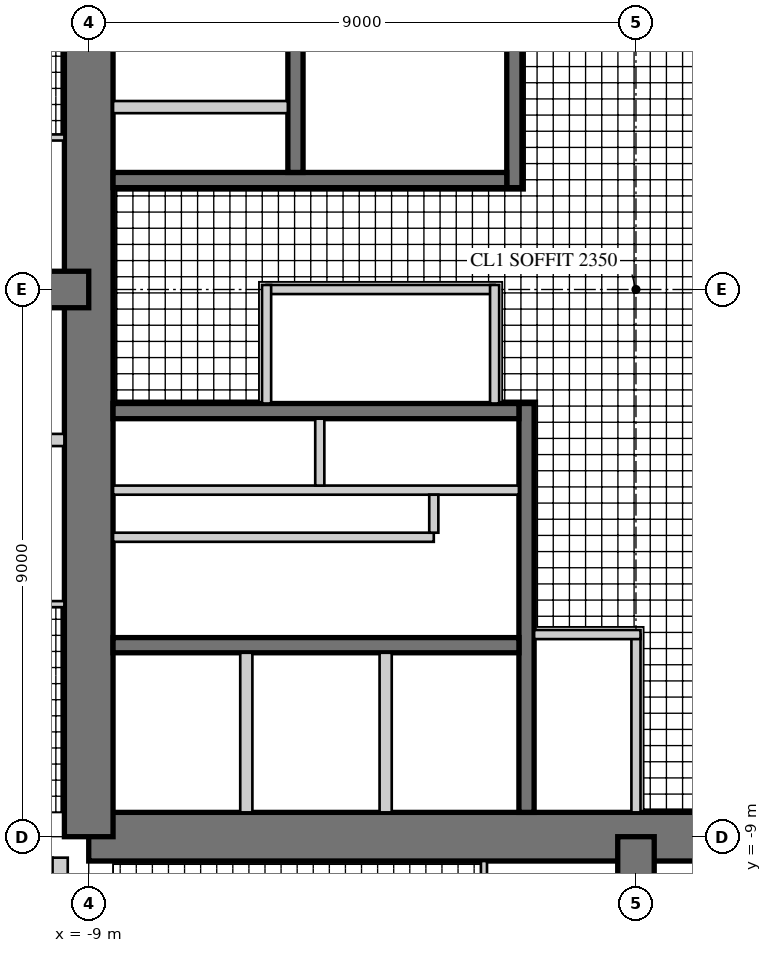
"""IFC4 building model, lengths in metres.
Left out: names, types, materials, properties, quantities, classifications, styles, units other than length and angle.
Written with IfcOpenShell. Run it as: python <this file> out.ifc"""

import sys

from ifc_helpers import new_model, si_unit, direction, frame, frame_2d, origin, place, context, subcontext, project, spatial, rectangle, extrude, element, fill, save


model = new_model("IFC4")
c1 = context("Model", 3, precision=1e-05, world=origin(), true_north=direction((0.0, 1.0)))
c2 = subcontext(c1, "Body", "Model", "MODEL_VIEW")
j1 = project(units=[si_unit("LENGTHUNIT", "METRE"), si_unit("PLANEANGLEUNIT", "RADIAN")], contexts=[c1])
p1 = place(None, origin())
s1 = spatial("IfcSite", under=j1, at=p1, CompositionType="ELEMENT")
p2 = place(p1, origin())
s2 = spatial("IfcBuilding", under=s1, at=p2, CompositionType="ELEMENT")
p3 = place(p2, frame((0.0, 0.0, 267.9)))
s3 = spatial("IfcBuildingStorey", under=s2, at=p3, CompositionType="ELEMENT", Elevation=267.9)
p4 = place(p3, frame((-9.0, -9.0, 0.0), z_axis=(0.0, 0.0, 1.0), x_axis=(1.0, 0.0, 0.0)))
e1 = element("IfcWall", 1, at=p4, inside=s3, PredefinedType="SHEAR", context=c2, shape_type="SweptSolid", body=[
    extrude(rectangle(XDim=18.0, YDim=0.8, at=frame_2d((9.0, 0.0))), origin(), (0.0, 0.0, 1.0), 3.4),
])
p5 = place(p4, frame((9.8, 0.0, 0.0)))
e2 = element("IfcOpeningElement", 2, at=p5, cuts=e1, PredefinedType="OPENING", context=c2, shape_type="SweptSolid", body=[
    extrude(rectangle(XDim=1.0, YDim=2.4, at=frame_2d((0.5, 1.2))), frame((0.0, 0.41, 0.0), z_axis=(0.0, -1.0, 0.0), x_axis=(1.0, 0.0, 0.0)), (0.0, 0.0, 1.0), 0.82),
])
p6 = place(p3, frame((-9.0, 9.0, 0.0), z_axis=(0.0, 0.0, 1.0), x_axis=(0.0, -1.0, 0.0)))
e3 = element("IfcWall", 3, at=p6, inside=s3, PredefinedType="SHEAR", context=c2, shape_type="SweptSolid", body=[
    extrude(rectangle(XDim=18.0, YDim=0.8, at=frame_2d((9.0, 0.0))), origin(), (0.0, 0.0, 1.0), 3.4),
])
p7 = place(p6, frame((9.8, 0.0, 0.0)))
e4 = element("IfcOpeningElement", 4, at=p7, cuts=e3, PredefinedType="OPENING", context=c2, shape_type="SweptSolid", body=[
    extrude(rectangle(XDim=1.0, YDim=2.4, at=frame_2d((0.5, 1.2))), frame((0.0, 0.41, 0.0), z_axis=(0.0, -1.0, 0.0), x_axis=(1.0, 0.0, 0.0)), (0.0, 0.0, 1.0), 0.82),
])
p8 = place(p3, frame((-2.0, 1.675, 0.0), z_axis=(0.0, 0.0, 1.0), x_axis=(0.0, 1.0, 0.0)))
e5 = element("IfcWall", 5, at=p8, inside=s3, PredefinedType="SHEAR", context=c2, shape_type="SweptSolid", body=[
    extrude(rectangle(XDim=6.925, YDim=0.25, at=frame_2d((3.462, 0.0))), origin(), (0.0, 0.0, 1.0), 3.4),
])
p9 = place(p8, frame((0.725, 0.0, 0.0)))
e6 = element("IfcOpeningElement", 6, at=p9, cuts=e5, PredefinedType="OPENING", context=c2, shape_type="SweptSolid", body=[
    extrude(rectangle(XDim=1.0, YDim=2.1, at=frame_2d((0.5, 1.05))), frame((0.0, 0.135, 0.0), z_axis=(0.0, -1.0, 0.0), x_axis=(1.0, 0.0, 0.0)), (0.0, 0.0, 1.0), 0.27),
])
p10 = place(p3, frame((-2.125, 1.8, 0.0), z_axis=(0.0, 0.0, 1.0), x_axis=(-1.0, 0.0, 0.0)))
e7 = element("IfcWall", 7, at=p10, inside=s3, PredefinedType="SHEAR", context=c2, shape_type="SweptSolid", body=[
    extrude(rectangle(XDim=6.475, YDim=0.25, at=frame_2d((3.238, 0.0))), origin(), (0.0, 0.0, 1.0), 3.4),
])
p11 = place(p3, frame((-5.6, 1.925, 0.0), z_axis=(0.0, 0.0, 1.0), x_axis=(0.0, 1.0, 0.0)))
e8 = element("IfcWall", 8, at=p11, inside=s3, PredefinedType="SHEAR", context=c2, shape_type="SweptSolid", body=[
    extrude(rectangle(XDim=3.55, YDim=0.25, at=frame_2d((1.775, 0.0))), origin(), (0.0, 0.0, 1.0), 3.4),
])
p12 = place(p11, frame((1.525, 0.0, 0.0)))
e9 = element("IfcOpeningElement", 9, at=p12, cuts=e8, PredefinedType="OPENING", context=c2, shape_type="SweptSolid", body=[
    extrude(rectangle(XDim=1.1, YDim=2.2, at=frame_2d((0.55, 1.1))), frame((0.0, 0.135, 0.0), z_axis=(0.0, -1.0, 0.0), x_axis=(1.0, 0.0, 0.0)), (0.0, 0.0, 1.0), 0.27),
])
p13 = place(p11, frame((0.075, 0.0, 0.0)))
e10 = element("IfcOpeningElement", 10, at=p13, cuts=e8, PredefinedType="OPENING", context=c2, shape_type="SweptSolid", body=[
    extrude(rectangle(XDim=0.8, YDim=2.1, at=frame_2d((0.4, 1.05))), frame((0.0, 0.135, 0.0), z_axis=(0.0, -1.0, 0.0), x_axis=(1.0, 0.0, 0.0)), (0.0, 0.0, 1.0), 0.27),
])
p14 = place(p3, frame((-5.725, 3.0, 0.0), z_axis=(0.0, 0.0, 1.0), x_axis=(-1.0, 0.0, 0.0)))
e11 = element("IfcWall", 11, at=p14, inside=s3, PredefinedType="PARTITIONING", context=c2, shape_type="SweptSolid", body=[
    extrude(rectangle(XDim=2.875, YDim=0.2, at=frame_2d((1.438, 0.0))), origin(), (0.0, 0.0, 1.0), 3.4),
])
p15 = place(p3, frame((-1.8, -1.875, 0.0), z_axis=(0.0, 0.0, 1.0), x_axis=(0.0, -1.0, 0.0)))
e12 = element("IfcWall", 12, at=p15, inside=s3, PredefinedType="SHEAR", context=c2, shape_type="SweptSolid", body=[
    extrude(rectangle(XDim=6.725, YDim=0.25, at=frame_2d((3.363, 0.0))), origin(), (0.0, 0.0, 1.0), 3.4),
])
p16 = place(p15, frame((1.875, 0.0, 0.0)))
e13 = element("IfcOpeningElement", 13, at=p16, cuts=e12, PredefinedType="OPENING", context=c2, shape_type="SweptSolid", body=[
    extrude(rectangle(XDim=1.6, YDim=2.4, at=frame_2d((0.8, 1.2))), frame((0.0, 0.135, 0.0), z_axis=(0.0, -1.0, 0.0), x_axis=(1.0, 0.0, 0.0)), (0.0, 0.0, 1.0), 0.27),
])
p17 = place(p3, frame((-1.925, -2.0, 0.0), z_axis=(0.0, 0.0, 1.0), x_axis=(-1.0, 0.0, 0.0)))
e14 = element("IfcWall", 14, at=p17, inside=s3, PredefinedType="SHEAR", context=c2, shape_type="SweptSolid", body=[
    extrude(rectangle(XDim=6.675, YDim=0.25, at=frame_2d((3.337, 0.0))), origin(), (0.0, 0.0, 1.0), 3.4),
])
p18 = place(p3, frame((-1.925, -5.85, 0.0), z_axis=(0.0, 0.0, 1.0), x_axis=(-1.0, 0.0, 0.0)))
e15 = element("IfcWall", 15, at=p18, inside=s3, PredefinedType="SHEAR", context=c2, shape_type="SweptSolid", body=[
    extrude(rectangle(XDim=6.675, YDim=0.25, at=frame_2d((3.337, 0.0))), origin(), (0.0, 0.0, 1.0), 3.4),
])
p19 = place(p18, frame((0.496, 0.0, 0.0)))
e16 = element("IfcOpeningElement", 16, at=p19, cuts=e15, PredefinedType="OPENING", context=c2, shape_type="SweptSolid", body=[
    extrude(rectangle(XDim=1.1, YDim=2.2, at=frame_2d((0.55, 1.1))), frame((0.0, 0.135, 0.0), z_axis=(0.0, -1.0, 0.0), x_axis=(1.0, 0.0, 0.0)), (0.0, 0.0, 1.0), 0.27),
])
p20 = place(p18, frame((2.788, 0.0, 0.0)))
e17 = element("IfcOpeningElement", 17, at=p20, cuts=e15, PredefinedType="OPENING", context=c2, shape_type="SweptSolid", body=[
    extrude(rectangle(XDim=1.1, YDim=2.2, at=frame_2d((0.55, 1.1))), frame((0.0, 0.135, 0.0), z_axis=(0.0, -1.0, 0.0), x_axis=(1.0, 0.0, 0.0)), (0.0, 0.0, 1.0), 0.27),
])
p21 = place(p18, frame((5.079, 0.0, 0.0)))
e18 = element("IfcOpeningElement", 18, at=p21, cuts=e15, PredefinedType="OPENING", context=c2, shape_type="SweptSolid", body=[
    extrude(rectangle(XDim=1.1, YDim=2.2, at=frame_2d((0.55, 1.1))), frame((0.0, 0.135, 0.0), z_axis=(0.0, -1.0, 0.0), x_axis=(1.0, 0.0, 0.0)), (0.0, 0.0, 1.0), 0.27),
])
p22 = place(p3, frame((-1.925, -3.3, 0.0), z_axis=(0.0, 0.0, 1.0), x_axis=(-1.0, 0.0, 0.0)))
e19 = element("IfcWall", 19, at=p22, inside=s3, PredefinedType="PARTITIONING", context=c2, shape_type="SweptSolid", body=[
    extrude(rectangle(XDim=6.675, YDim=0.15, at=frame_2d((3.337, 0.0))), origin(), (0.0, 0.0, 1.0), 3.4),
])
p23 = place(p22, frame((0.075, 0.0, 0.0)))
e20 = element("IfcOpeningElement", 20, at=p23, cuts=e19, PredefinedType="OPENING", context=c2, shape_type="SweptSolid", body=[
    extrude(rectangle(XDim=0.8, YDim=2.1, at=frame_2d((0.4, 1.05))), frame((0.0, 0.085, 0.0), z_axis=(0.0, -1.0, 0.0), x_axis=(1.0, 0.0, 0.0)), (0.0, 0.0, 1.0), 0.17),
])
p24 = place(p22, frame((3.675, 0.0, 0.0)))
e21 = element("IfcOpeningElement", 21, at=p24, cuts=e19, PredefinedType="OPENING", context=c2, shape_type="SweptSolid", body=[
    extrude(rectangle(XDim=0.8, YDim=2.1, at=frame_2d((0.4, 1.05))), frame((0.0, 0.085, 0.0), z_axis=(0.0, -1.0, 0.0), x_axis=(1.0, 0.0, 0.0)), (0.0, 0.0, 1.0), 0.17),
])
p25 = place(p3, frame((-5.2, -2.125, 0.0), z_axis=(0.0, 0.0, 1.0), x_axis=(0.0, -1.0, 0.0)))
e22 = element("IfcWall", 22, at=p25, inside=s3, PredefinedType="PARTITIONING", context=c2, shape_type="SweptSolid", body=[
    extrude(rectangle(XDim=1.1, YDim=0.15, at=frame_2d((0.55, 0.0))), origin(), (0.0, 0.0, 1.0), 3.4),
])
for number, where, z_axis, x_axis in (
    (23, (-4.117, -5.975, 0.0), (0.0, 0.0, 1.0), (0.0, -1.0, 0.0)),
    (24, (-6.408, -5.975, 0.0), (0.0, 0.0, 1.0), (0.0, -1.0, 0.0)),
):
    element("IfcWall", number, at=place(p3, frame(where, z_axis=z_axis, x_axis=x_axis)), inside=s3, PredefinedType="PARTITIONING", context=c2, shape_type="SweptSolid", body=[
        extrude(rectangle(XDim=2.625, YDim=0.2, at=frame_2d((1.312, 0.0))), origin(), (0.0, 0.0, 1.0), 3.4),
    ])
p26 = place(p3, frame((0.0, -9.0, 0.0), z_axis=(0.0, 0.0, 1.0), x_axis=(0.0, -1.0, 0.0)))
e25 = element("IfcWall", 25, at=p26, inside=s3, PredefinedType="SHEAR", context=c2, shape_type="SweptSolid", body=[
    extrude(rectangle(XDim=9.0, YDim=0.6, at=frame_2d((4.5, 0.0))), origin(), (0.0, 0.0, 1.0), 3.4),
])
p27 = place(p26, frame((3.8, 0.0, 0.0)))
e26 = element("IfcOpeningElement", 26, at=p27, cuts=e25, PredefinedType="OPENING", context=c2, shape_type="SweptSolid", body=[
    extrude(rectangle(XDim=1.0, YDim=2.15, at=frame_2d((0.5, 1.075))), frame((0.0, 0.31, 0.0), z_axis=(0.0, -1.0, 0.0), x_axis=(1.0, 0.0, 0.0)), (0.0, 0.0, 1.0), 0.62),
])
p28 = place(p26, frame((7.0, 0.0, 0.0)))
e27 = element("IfcOpeningElement", 27, at=p28, cuts=e25, PredefinedType="OPENING", context=c2, shape_type="SweptSolid", body=[
    extrude(rectangle(XDim=1.0, YDim=2.2, at=frame_2d((0.5, 1.1))), frame((0.0, 0.31, 0.0), z_axis=(0.0, -1.0, 0.0), x_axis=(1.0, 0.0, 0.0)), (0.0, 0.0, 1.0), 0.62),
])
p29 = place(p3, frame((-9.0, 0.0, 0.0), z_axis=(0.0, 0.0, 1.0), x_axis=(-1.0, 0.0, 0.0)))
e28 = element("IfcWall", 28, at=p29, inside=s3, PredefinedType="SHEAR", context=c2, shape_type="SweptSolid", body=[
    extrude(rectangle(XDim=9.0, YDim=0.6, at=frame_2d((4.5, 0.0))), origin(), (0.0, 0.0, 1.0), 3.4),
])
p30 = place(p29, frame((3.8, 0.0, 0.0)))
e29 = element("IfcOpeningElement", 29, at=p30, cuts=e28, PredefinedType="OPENING", context=c2, shape_type="SweptSolid", body=[
    extrude(rectangle(XDim=1.0, YDim=2.15, at=frame_2d((0.5, 1.075))), frame((0.0, 0.31, 0.0), z_axis=(0.0, -1.0, 0.0), x_axis=(1.0, 0.0, 0.0)), (0.0, 0.0, 1.0), 0.62),
])
p31 = place(p29, frame((7.0, 0.0, 0.0)))
e30 = element("IfcOpeningElement", 30, at=p31, cuts=e28, PredefinedType="OPENING", context=c2, shape_type="SweptSolid", body=[
    extrude(rectangle(XDim=1.0, YDim=2.2, at=frame_2d((0.5, 1.1))), frame((0.0, 0.31, 0.0), z_axis=(0.0, -1.0, 0.0), x_axis=(1.0, 0.0, 0.0)), (0.0, 0.0, 1.0), 0.62),
])
p32 = place(p3, frame((-12.47, -9.47, 0.0), z_axis=(0.0, 0.0, 1.0), x_axis=(1.0, 0.0, 0.0)))
e31 = element("IfcWall", 31, at=p32, inside=s3, PredefinedType="SOLIDWALL", context=c2, shape_type="SweptSolid", body=[
    extrude(rectangle(XDim=2.875, YDim=0.25, at=frame_2d((1.438, 0.0))), origin(), (0.0, 0.0, 1.0), 3.22),
])
p33 = place(p32, frame((0.6, 0.0, 0.0)))
e32 = element("IfcOpeningElement", 32, at=p33, cuts=e31, PredefinedType="OPENING", context=c2, shape_type="SweptSolid", body=[
    extrude(rectangle(XDim=1.0, YDim=2.2, at=frame_2d((0.5, 1.1))), frame((0.0, 0.135, 0.0), z_axis=(0.0, -1.0, 0.0), x_axis=(1.0, 0.0, 0.0)), (0.0, 0.0, 1.0), 0.27),
])
p34 = place(p3, frame((-9.47, -9.345, 0.0), z_axis=(0.0, 0.0, 1.0), x_axis=(0.0, -1.0, 0.0)))
e33 = element("IfcWall", 33, at=p34, inside=s3, PredefinedType="SOLIDWALL", context=c2, shape_type="SweptSolid", body=[
    extrude(rectangle(XDim=3.125, YDim=0.25, at=frame_2d((1.562, 0.0))), origin(), (0.0, 0.0, 1.0), 3.22),
])
p35 = place(p34, frame((0.6, 0.0, 0.0)))
e34 = element("IfcOpeningElement", 34, at=p35, cuts=e33, PredefinedType="OPENING", context=c2, shape_type="SweptSolid", body=[
    extrude(rectangle(XDim=1.0, YDim=2.2, at=frame_2d((0.5, 1.1))), frame((0.0, 0.135, 0.0), z_axis=(0.0, -1.0, 0.0), x_axis=(1.0, 0.0, 0.0)), (0.0, 0.0, 1.0), 0.27),
])
p36 = place(p3, frame((-2.325, 0.0, 0.0), z_axis=(0.0, 0.0, 1.0), x_axis=(-1.0, 0.0, 0.0)))
e35 = element("IfcWall", 35, at=p36, inside=s3, PredefinedType="PARTITIONING", context=c2, shape_type="SweptSolid", body=[
    extrude(rectangle(XDim=3.75, YDim=0.15, at=frame_2d((1.875, 0.0))), origin(), (0.0, 0.0, 1.0), 3.22),
])
p37 = place(p36, frame((0.4, 0.0, 0.0)))
e36 = element("IfcOpeningElement", 36, at=p37, cuts=e35, PredefinedType="OPENING", context=c2, shape_type="SweptSolid", body=[
    extrude(rectangle(XDim=1.0, YDim=2.1, at=frame_2d((0.5, 1.05))), frame((0.0, 0.085, 0.0), z_axis=(0.0, -1.0, 0.0), x_axis=(1.0, 0.0, 0.0)), (0.0, 0.0, 1.0), 0.17),
])
for number, where, z_axis, x_axis in (
    (37, (-2.325, -1.875, 0.0), (0.0, 0.0, 1.0), (0.0, 1.0, 0.0)),
    (38, (-6.075, 0.075, 0.0), (0.0, 0.0, 1.0), (0.0, -1.0, 0.0)),
):
    element("IfcWall", number, at=place(p3, frame(where, z_axis=z_axis, x_axis=x_axis)), inside=s3, PredefinedType="PARTITIONING", context=c2, shape_type="SweptSolid", body=[
        extrude(rectangle(XDim=1.95, YDim=0.15, at=frame_2d((0.975, 0.0))), origin(), (0.0, 0.0, 1.0), 3.22),
    ])
p38 = place(p3, frame((0.0, -5.675, 0.0), z_axis=(0.0, 0.0, 1.0), x_axis=(0.0, -1.0, 0.0)))
e39 = element("IfcWall", 39, at=p38, inside=s3, PredefinedType="PARTITIONING", context=c2, shape_type="SweptSolid", body=[
    extrude(rectangle(XDim=2.925, YDim=0.15, at=frame_2d((1.462, 0.0))), origin(), (0.0, 0.0, 1.0), 3.22),
])
p39 = place(p38, frame((0.4, 0.0, 0.0)))
e40 = element("IfcOpeningElement", 40, at=p39, cuts=e39, PredefinedType="OPENING", context=c2, shape_type="SweptSolid", body=[
    extrude(rectangle(XDim=1.0, YDim=2.1, at=frame_2d((0.5, 1.05))), frame((0.0, 0.085, 0.0), z_axis=(0.0, -1.0, 0.0), x_axis=(1.0, 0.0, 0.0)), (0.0, 0.0, 1.0), 0.17),
])
p40 = place(p3, frame((-1.675, -5.675, 0.0), z_axis=(0.0, 0.0, 1.0), x_axis=(1.0, 0.0, 0.0)))
e41 = element("IfcWall", 41, at=p40, inside=s3, PredefinedType="PARTITIONING", context=c2, shape_type="SweptSolid", body=[
    extrude(rectangle(XDim=1.75, YDim=0.15, at=frame_2d((0.875, 0.0))), origin(), (0.0, 0.0, 1.0), 3.22),
])
p41 = place(p3, frame((-3.325, -4.075, 0.0), z_axis=(0.0, 0.0, 1.0), x_axis=(-1.0, 0.0, 0.0)))
e42 = element("IfcWall", 42, at=p41, inside=s3, PredefinedType="PARTITIONING", context=c2, shape_type="SweptSolid", body=[
    extrude(rectangle(XDim=5.275, YDim=0.15, at=frame_2d((2.638, 0.0))), origin(), (0.0, 0.0, 1.0), 3.22),
])
p42 = place(p41, frame((2.137, 0.0, 0.0)))
e43 = element("IfcOpeningElement", 43, at=p42, cuts=e42, PredefinedType="OPENING", context=c2, shape_type="SweptSolid", body=[
    extrude(rectangle(XDim=1.0, YDim=2.1, at=frame_2d((0.5, 1.05))), frame((0.0, 0.085, 0.0), z_axis=(0.0, -1.0, 0.0), x_axis=(1.0, 0.0, 0.0)), (0.0, 0.0, 1.0), 0.17),
])
p43 = place(p3, frame((-3.325, -3.375, 0.0), z_axis=(0.0, 0.0, 1.0), x_axis=(0.0, -1.0, 0.0)))
e44 = element("IfcWall", 44, at=p43, inside=s3, PredefinedType="PARTITIONING", context=c2, shape_type="SweptSolid", body=[
    extrude(rectangle(XDim=0.625, YDim=0.15, at=frame_2d((0.312, 0.0))), origin(), (0.0, 0.0, 1.0), 3.22),
])
p44 = place(p3, frame((-2.5, -9.4, 0.0), z_axis=(0.0, 0.0, 1.0), x_axis=(0.0, -1.0, 0.0)))
e45 = element("IfcWall", 45, at=p44, inside=s3, PredefinedType="PARTITIONING", context=c2, shape_type="SweptSolid", body=[
    extrude(rectangle(XDim=2.65, YDim=0.1, at=frame_2d((1.325, 0.0))), origin(), (0.0, 0.0, 1.0), 3.22),
])
p45 = place(p3, frame((-9.4, -5.175, 0.0), z_axis=(0.0, 0.0, 1.0), x_axis=(-1.0, 0.0, 0.0)))
e46 = element("IfcWall", 46, at=p45, inside=s3, PredefinedType="PARTITIONING", context=c2, shape_type="SweptSolid", body=[
    extrude(rectangle(XDim=2.85, YDim=0.1, at=frame_2d((1.425, 0.0))), origin(), (0.0, 0.0, 1.0), 3.22),
])
p46 = place(p3, frame((-9.4, 2.5, 0.0), z_axis=(0.0, 0.0, 1.0), x_axis=(-1.0, 0.0, 0.0)))
e47 = element("IfcWall", 47, at=p46, inside=s3, PredefinedType="PARTITIONING", context=c2, shape_type="SweptSolid", body=[
    extrude(rectangle(XDim=2.65, YDim=0.1, at=frame_2d((1.325, 0.0))), origin(), (0.0, 0.0, 1.0), 3.22),
])
p47 = place(p3, frame((-9.4, -2.475, 0.0), z_axis=(0.0, 0.0, 1.0), x_axis=(-1.0, 0.0, 0.0)))
e48 = element("IfcWall", 48, at=p47, inside=s3, PredefinedType="SOLIDWALL", context=c2, shape_type="SweptSolid", body=[
    extrude(rectangle(XDim=5.6, YDim=0.2, at=frame_2d((2.8, 0.0))), origin(), (0.0, 0.0, 1.0), 3.22),
])
p48 = place(p47, frame((3.4, 0.0, 0.0)))
e49 = element("IfcOpeningElement", 49, at=p48, cuts=e48, PredefinedType="OPENING", context=c2, shape_type="SweptSolid", body=[
    extrude(rectangle(XDim=1.0, YDim=2.15, at=frame_2d((0.5, 1.075))), frame((0.0, 0.11, 0.0), z_axis=(0.0, -1.0, 0.0), x_axis=(1.0, 0.0, 0.0)), (0.0, 0.0, 1.0), 0.22),
])
p49 = place(p37, origin())
e50 = element("IfcDoor", 50, at=p49, inside=s3, OperationType="SINGLE_SWING_LEFT", PredefinedType="DOOR", context=c2, shape_type="SweptSolid", body=[
    extrude(rectangle(XDim=1.0, YDim=2.1, at=frame_2d((0.5, 1.05))), frame((0.0, 0.025, 0.0), z_axis=(0.0, -1.0, 0.0), x_axis=(1.0, 0.0, 0.0)), (0.0, 0.0, 1.0), 0.05),
])
fill(e36, e50)
p50 = place(p39, frame((1.0, 0.0, 0.0), z_axis=(0.0, 0.0, 1.0), x_axis=(-1.0, 0.0, 0.0)))
e51 = element("IfcDoor", 51, at=p50, inside=s3, OperationType="SINGLE_SWING_RIGHT", PredefinedType="DOOR", context=c2, shape_type="SweptSolid", body=[
    extrude(rectangle(XDim=1.0, YDim=2.1, at=frame_2d((0.5, 1.05))), frame((0.0, 0.025, 0.0), z_axis=(0.0, -1.0, 0.0), x_axis=(1.0, 0.0, 0.0)), (0.0, 0.0, 1.0), 0.05),
])
fill(e40, e51)
p51 = place(p42, frame((1.0, 0.0, 0.0), z_axis=(0.0, 0.0, 1.0), x_axis=(-1.0, 0.0, 0.0)))
e52 = element("IfcDoor", 52, at=p51, inside=s3, OperationType="DOUBLE_DOOR_SINGLE_SWING", PredefinedType="DOOR", context=c2, shape_type="SweptSolid", body=[
    extrude(rectangle(XDim=1.0, YDim=2.1, at=frame_2d((0.5, 1.05))), frame((0.0, 0.025, 0.0), z_axis=(0.0, -1.0, 0.0), x_axis=(1.0, 0.0, 0.0)), (0.0, 0.0, 1.0), 0.05),
])
fill(e43, e52)
p52 = place(p5, origin())
e53 = element("IfcDoor", 53, at=p52, inside=s3, OperationType="SINGLE_SWING_RIGHT", PredefinedType="DOOR", context=c2, shape_type="SweptSolid", body=[
    extrude(rectangle(XDim=1.0, YDim=2.4, at=frame_2d((0.5, 1.2))), frame((0.0, 0.055, 0.0), z_axis=(0.0, -1.0, 0.0), x_axis=(1.0, 0.0, 0.0)), (0.0, 0.0, 1.0), 0.05),
])
fill(e2, e53)
p53 = place(p7, origin())
e54 = element("IfcDoor", 54, at=p53, inside=s3, OperationType="SINGLE_SWING_RIGHT", PredefinedType="DOOR", context=c2, shape_type="SweptSolid", body=[
    extrude(rectangle(XDim=1.0, YDim=2.4, at=frame_2d((0.5, 1.2))), frame((0.0, 0.055, 0.0), z_axis=(0.0, -1.0, 0.0), x_axis=(1.0, 0.0, 0.0)), (0.0, 0.0, 1.0), 0.05),
])
fill(e4, e54)
p54 = place(p9, origin())
e55 = element("IfcDoor", 55, at=p54, inside=s3, OperationType="SINGLE_SWING_LEFT", PredefinedType="DOOR", context=c2, shape_type="SweptSolid", body=[
    extrude(rectangle(XDim=1.0, YDim=2.1, at=frame_2d((0.5, 1.05))), frame((0.0, 0.025, 0.0), z_axis=(0.0, -1.0, 0.0), x_axis=(1.0, 0.0, 0.0)), (0.0, 0.0, 1.0), 0.05),
])
fill(e6, e55)
p55 = place(p12, origin())
e56 = element("IfcDoor", 56, at=p55, inside=s3, OperationType="DOUBLE_DOOR_SLIDING", PredefinedType="DOOR", context=c2, shape_type="SweptSolid", body=[
    extrude(rectangle(XDim=1.1, YDim=2.2, at=frame_2d((0.55, 1.1))), frame((0.0, 0.025, 0.0), z_axis=(0.0, -1.0, 0.0), x_axis=(1.0, 0.0, 0.0)), (0.0, 0.0, 1.0), 0.05),
])
fill(e9, e56)
p56 = place(p13, origin())
e57 = element("IfcDoor", 57, at=p56, inside=s3, OperationType="SINGLE_SWING_LEFT", PredefinedType="DOOR", context=c2, shape_type="SweptSolid", body=[
    extrude(rectangle(XDim=0.8, YDim=2.1, at=frame_2d((0.4, 1.05))), frame((0.0, 0.025, 0.0), z_axis=(0.0, -1.0, 0.0), x_axis=(1.0, 0.0, 0.0)), (0.0, 0.0, 1.0), 0.05),
])
fill(e10, e57)
p57 = place(p19, origin())
e58 = element("IfcDoor", 58, at=p57, inside=s3, OperationType="DOUBLE_DOOR_SLIDING", PredefinedType="DOOR", context=c2, shape_type="SweptSolid", body=[
    extrude(rectangle(XDim=1.1, YDim=2.2, at=frame_2d((0.55, 1.1))), frame((0.0, 0.025, 0.0), z_axis=(0.0, -1.0, 0.0), x_axis=(1.0, 0.0, 0.0)), (0.0, 0.0, 1.0), 0.05),
])
fill(e16, e58)
p58 = place(p20, origin())
e59 = element("IfcDoor", 59, at=p58, inside=s3, OperationType="DOUBLE_DOOR_SLIDING", PredefinedType="DOOR", context=c2, shape_type="SweptSolid", body=[
    extrude(rectangle(XDim=1.1, YDim=2.2, at=frame_2d((0.55, 1.1))), frame((0.0, 0.025, 0.0), z_axis=(0.0, -1.0, 0.0), x_axis=(1.0, 0.0, 0.0)), (0.0, 0.0, 1.0), 0.05),
])
fill(e17, e59)
p59 = place(p21, origin())
e60 = element("IfcDoor", 60, at=p59, inside=s3, OperationType="DOUBLE_DOOR_SLIDING", PredefinedType="DOOR", context=c2, shape_type="SweptSolid", body=[
    extrude(rectangle(XDim=1.1, YDim=2.2, at=frame_2d((0.55, 1.1))), frame((0.0, 0.025, 0.0), z_axis=(0.0, -1.0, 0.0), x_axis=(1.0, 0.0, 0.0)), (0.0, 0.0, 1.0), 0.05),
])
fill(e18, e60)
p60 = place(p16, origin())
e61 = element("IfcDoor", 61, at=p60, inside=s3, OperationType="DOUBLE_DOOR_DOUBLE_SWING", PredefinedType="DOOR", context=c2, shape_type="SweptSolid", body=[
    extrude(rectangle(XDim=1.6, YDim=2.4, at=frame_2d((0.8, 1.2))), frame((0.0, 0.025, 0.0), z_axis=(0.0, -1.0, 0.0), x_axis=(1.0, 0.0, 0.0)), (0.0, 0.0, 1.0), 0.05),
])
fill(e13, e61)
p61 = place(p23, frame((0.8, 0.0, 0.0), z_axis=(0.0, 0.0, 1.0), x_axis=(-1.0, 0.0, 0.0)))
e62 = element("IfcDoor", 62, at=p61, inside=s3, OperationType="SINGLE_SWING_RIGHT", PredefinedType="DOOR", context=c2, shape_type="SweptSolid", body=[
    extrude(rectangle(XDim=0.8, YDim=2.1, at=frame_2d((0.4, 1.05))), frame((0.0, 0.025, 0.0), z_axis=(0.0, -1.0, 0.0), x_axis=(1.0, 0.0, 0.0)), (0.0, 0.0, 1.0), 0.05),
])
fill(e20, e62)
p62 = place(p24, frame((0.8, 0.0, 0.0), z_axis=(0.0, 0.0, 1.0), x_axis=(-1.0, 0.0, 0.0)))
e63 = element("IfcDoor", 63, at=p62, inside=s3, OperationType="SINGLE_SWING_RIGHT", PredefinedType="DOOR", context=c2, shape_type="SweptSolid", body=[
    extrude(rectangle(XDim=0.8, YDim=2.1, at=frame_2d((0.4, 1.05))), frame((0.0, 0.025, 0.0), z_axis=(0.0, -1.0, 0.0), x_axis=(1.0, 0.0, 0.0)), (0.0, 0.0, 1.0), 0.05),
])
fill(e21, e63)
save(model, sys.argv[1])
